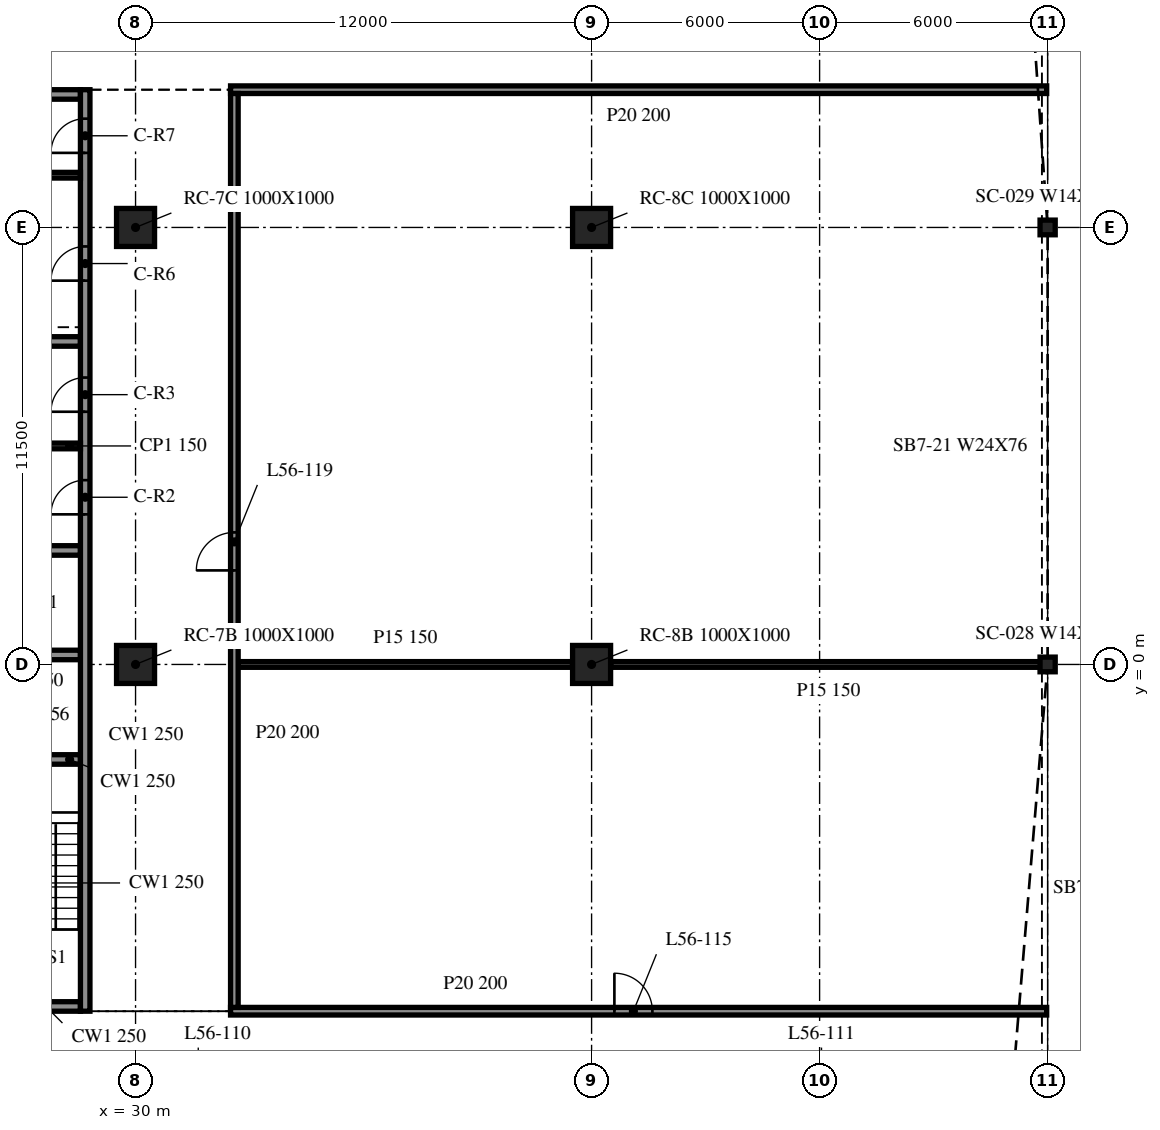
"""IFC4 building model, lengths in metres.
Left out: names, types, materials, properties, quantities, classifications, styles, units other than length and angle.
Written with IfcOpenShell. Run it as: python <this file> out.ifc"""

import sys

from ifc_helpers import new_model, si_unit, direction, frame, frame_2d, origin, origin_2d, place, context, subcontext, project, spatial, rectangle, i_section, extrude, element, fill, save


model = new_model("IFC4")
c1 = context("Model", 3, precision=1e-05, world=origin(), true_north=direction((0.0, 1.0)))
c2 = subcontext(c1, "Body", "Model", "MODEL_VIEW")
j1 = project(units=[si_unit("LENGTHUNIT", "METRE"), si_unit("PLANEANGLEUNIT", "RADIAN")], contexts=[c1])
p1 = place(None, origin())
s1 = spatial("IfcSite", under=j1, at=p1, CompositionType="ELEMENT")
p2 = place(p1, origin())
s2 = spatial("IfcBuilding", under=s1, at=p2, CompositionType="ELEMENT")
p3 = place(p2, frame((0.0, 0.0, 232.4)))
s3 = spatial("IfcBuildingStorey", under=s2, at=p3, CompositionType="ELEMENT", Elevation=232.4)
for number, where, z_axis, x_axis in (
    (1, (30.0, 0.0, -0.34), (0.0, 0.0, 1.0), (1.0, 0.0, 0.0)),
    (2, (30.0, 11.5, -0.34), (0.0, 0.0, 1.0), (1.0, 0.0, 0.0)),
    (3, (42.0, 0.0, -0.34), (0.0, 0.0, 1.0), (1.0, 0.0, 0.0)),
    (4, (42.0, 11.5, -0.34), (0.0, 0.0, 1.0), (1.0, 0.0, 0.0)),
):
    element("IfcColumn", number, at=place(p3, frame(where, z_axis=z_axis, x_axis=x_axis)), inside=s3, PredefinedType="COLUMN", context=c2, shape_type="SweptSolid", body=[
        extrude(rectangle(XDim=1.0, YDim=1.0, at=origin_2d()), origin(), (0.0, 0.0, 1.0), 3.8),
    ])
for number, where, z_axis, x_axis in (
    (5, (54.0, 0.0, -0.34), (0.0, 0.0, 1.0), (1.0, 0.0, 0.0)),
    (6, (54.0, 11.5, -0.34), (0.0, 0.0, 1.0), (1.0, 0.0, 0.0)),
):
    element("IfcColumn", number, at=place(p3, frame(where, z_axis=z_axis, x_axis=x_axis)), inside=s3, PredefinedType="COLUMN", context=c2, shape_type="SweptSolid", body=[
        extrude(i_section(OverallWidth=0.399, OverallDepth=0.386, WebThickness=0.021, FlangeThickness=0.033, at=origin_2d()), origin(), (0.0, 0.0, 1.0), 3.8),
    ])
p4 = place(p3, frame((28.675, -9.125, 0.0), z_axis=(0.0, 0.0, 1.0), x_axis=(0.0, 1.0, 0.0)))
e7 = element("IfcWall", 7, at=p4, inside=s3, PredefinedType="SOLIDWALL", context=c2, shape_type="SweptSolid", body=[
    extrude(rectangle(XDim=24.25, YDim=0.25, at=frame_2d((12.125, 0.0))), origin(), (0.0, 0.0, 1.0), 3.46),
])
p5 = place(p4, frame((13.075, 0.0, 0.0)))
e8 = element("IfcOpeningElement", 8, at=p5, cuts=e7, PredefinedType="OPENING", context=c2, shape_type="SweptSolid", body=[
    extrude(rectangle(XDim=0.9, YDim=2.1, at=frame_2d((0.45, 1.05))), frame((0.0, 0.135, 0.0), z_axis=(0.0, -1.0, 0.0), x_axis=(1.0, 0.0, 0.0)), (0.0, 0.0, 1.0), 0.27),
])
p6 = place(p4, frame((15.775, 0.0, 0.0)))
e9 = element("IfcOpeningElement", 9, at=p6, cuts=e7, PredefinedType="OPENING", context=c2, shape_type="SweptSolid", body=[
    extrude(rectangle(XDim=0.9, YDim=2.1, at=frame_2d((0.45, 1.05))), frame((0.0, 0.135, 0.0), z_axis=(0.0, -1.0, 0.0), x_axis=(1.0, 0.0, 0.0)), (0.0, 0.0, 1.0), 0.27),
])
p7 = place(p4, frame((19.225, 0.0, 0.0)))
e10 = element("IfcOpeningElement", 10, at=p7, cuts=e7, PredefinedType="OPENING", context=c2, shape_type="SweptSolid", body=[
    extrude(rectangle(XDim=0.9, YDim=2.1, at=frame_2d((0.45, 1.05))), frame((0.0, 0.135, 0.0), z_axis=(0.0, -1.0, 0.0), x_axis=(1.0, 0.0, 0.0)), (0.0, 0.0, 1.0), 0.27),
])
p8 = place(p4, frame((22.587, 0.0, 0.0)))
e11 = element("IfcOpeningElement", 11, at=p8, cuts=e7, PredefinedType="OPENING", context=c2, shape_type="SweptSolid", body=[
    extrude(rectangle(XDim=0.9, YDim=2.1, at=frame_2d((0.45, 1.05))), frame((0.0, 0.135, 0.0), z_axis=(0.0, -1.0, 0.0), x_axis=(1.0, 0.0, 0.0)), (0.0, 0.0, 1.0), 0.27),
])
p9 = place(p3, frame((28.55, -9.0, 0.0), z_axis=(0.0, 0.0, 1.0), x_axis=(-1.0, 0.0, 0.0)))
e12 = element("IfcWall", 12, at=p9, inside=s3, PredefinedType="SOLIDWALL", context=c2, shape_type="SweptSolid", body=[
    extrude(rectangle(XDim=9.1, YDim=0.25, at=frame_2d((4.55, 0.0))), origin(), (0.0, 0.0, 1.0), 3.46),
])
p10 = place(p9, frame((3.65, 0.0, 0.0)))
e13 = element("IfcOpeningElement", 13, at=p10, cuts=e12, PredefinedType="OPENING", context=c2, shape_type="SweptSolid", body=[
    extrude(rectangle(XDim=1.8, YDim=2.1, at=frame_2d((0.9, 1.05))), frame((0.0, 0.135, 0.0), z_axis=(0.0, -1.0, 0.0), x_axis=(1.0, 0.0, 0.0)), (0.0, 0.0, 1.0), 0.27),
])
p11 = place(p3, frame((19.45, 15.0, 0.0), z_axis=(0.0, 0.0, 1.0), x_axis=(1.0, 0.0, 0.0)))
e14 = element("IfcWall", 14, at=p11, inside=s3, PredefinedType="SOLIDWALL", context=c2, shape_type="SweptSolid", body=[
    extrude(rectangle(XDim=9.1, YDim=0.25, at=frame_2d((4.55, 0.0))), origin(), (0.0, 0.0, 1.0), 3.46),
])
p12 = place(p11, frame((3.65, 0.0, 0.0)))
e15 = element("IfcOpeningElement", 15, at=p12, cuts=e14, PredefinedType="OPENING", context=c2, shape_type="SweptSolid", body=[
    extrude(rectangle(XDim=1.8, YDim=2.1, at=frame_2d((0.9, 1.05))), frame((0.0, 0.135, 0.0), z_axis=(0.0, -1.0, 0.0), x_axis=(1.0, 0.0, 0.0)), (0.0, 0.0, 1.0), 0.27),
])
for number, where, z_axis, x_axis in (
    (16, (25.7, -2.5, 0.0), (0.0, 0.0, 1.0), (1.0, 0.0, 0.0)),
    (17, (25.7, 0.25, 0.0), (0.0, 0.0, 1.0), (1.0, 0.0, 0.0)),
    (18, (25.7, 3.0, 0.0), (0.0, 0.0, 1.0), (1.0, 0.0, 0.0)),
    (19, (25.7, 8.5, 0.0), (0.0, 0.0, 1.0), (1.0, 0.0, 0.0)),
):
    element("IfcWall", number, at=place(p3, frame(where, z_axis=z_axis, x_axis=x_axis)), inside=s3, PredefinedType="SOLIDWALL", context=c2, shape_type="SweptSolid", body=[
        extrude(rectangle(XDim=2.85, YDim=0.25, at=frame_2d((1.425, 0.0))), origin(), (0.0, 0.0, 1.0), 3.46),
    ])
for number, where, z_axis, x_axis in (
    (20, (25.7, 5.75, 0.0), (0.0, 0.0, 1.0), (1.0, 0.0, 0.0)),
    (21, (25.7, 12.875, 0.0), (0.0, 0.0, 1.0), (1.0, 0.0, 0.0)),
):
    element("IfcWall", number, at=place(p3, frame(where, z_axis=z_axis, x_axis=x_axis)), inside=s3, PredefinedType="PARTITIONING", context=c2, shape_type="SweptSolid", body=[
        extrude(rectangle(XDim=2.85, YDim=0.15, at=frame_2d((1.425, 0.0))), origin(), (0.0, 0.0, 1.0), 3.46),
    ])
p13 = place(p3, frame((32.5, -9.125, 0.0), z_axis=(0.0, 0.0, 1.0), x_axis=(1.0, 0.0, 0.0)))
e22 = element("IfcWall", 22, at=p13, inside=s3, PredefinedType="PARTITIONING", context=c2, shape_type="SweptSolid", body=[
    extrude(rectangle(XDim=21.475, YDim=0.2, at=frame_2d((10.738, 0.0))), origin(), (0.0, 0.0, 1.0), 3.46),
])
p14 = place(p13, frame((10.1, 0.0, 0.0)))
e23 = element("IfcOpeningElement", 23, at=p14, cuts=e22, PredefinedType="OPENING", context=c2, shape_type="SweptSolid", body=[
    extrude(rectangle(XDim=1.0, YDim=2.1, at=frame_2d((0.5, 1.05))), frame((0.0, 0.11, 0.0), z_axis=(0.0, -1.0, 0.0), x_axis=(1.0, 0.0, 0.0)), (0.0, 0.0, 1.0), 0.22),
])
p15 = place(p3, frame((32.7, 0.0, 0.0), z_axis=(0.0, 0.0, 1.0), x_axis=(1.0, 0.0, 0.0)))
e24 = element("IfcWall", 24, at=p15, inside=s3, PredefinedType="PARTITIONING", context=c2, shape_type="SweptSolid", body=[
    extrude(rectangle(XDim=8.8, YDim=0.15, at=frame_2d((4.4, 0.0))), origin(), (0.0, 0.0, 1.0), 3.46),
])
p16 = place(p3, frame((42.5, 0.0, 0.0), z_axis=(0.0, 0.0, 1.0), x_axis=(1.0, 0.0, 0.0)))
e25 = element("IfcWall", 25, at=p16, inside=s3, PredefinedType="PARTITIONING", context=c2, shape_type="SweptSolid", body=[
    extrude(rectangle(XDim=11.475, YDim=0.15, at=frame_2d((5.738, 0.0))), origin(), (0.0, 0.0, 1.0), 3.46),
])
p17 = place(p3, frame((32.5, 15.125, 0.0), z_axis=(0.0, 0.0, 1.0), x_axis=(1.0, 0.0, 0.0)))
e26 = element("IfcWall", 26, at=p17, inside=s3, PredefinedType="PARTITIONING", context=c2, shape_type="SweptSolid", body=[
    extrude(rectangle(XDim=21.475, YDim=0.2, at=frame_2d((10.738, 0.0))), origin(), (0.0, 0.0, 1.0), 3.46),
])
p18 = place(p3, frame((32.6, -9.025, 0.0), z_axis=(0.0, 0.0, 1.0), x_axis=(0.0, 1.0, 0.0)))
e27 = element("IfcWall", 27, at=p18, inside=s3, PredefinedType="PARTITIONING", context=c2, shape_type="SweptSolid", body=[
    extrude(rectangle(XDim=24.05, YDim=0.2, at=frame_2d((12.025, 0.0))), origin(), (0.0, 0.0, 1.0), 3.46),
])
p19 = place(p18, frame((11.5, 0.0, 0.0)))
e28 = element("IfcOpeningElement", 28, at=p19, cuts=e27, PredefinedType="OPENING", context=c2, shape_type="SweptSolid", body=[
    extrude(rectangle(XDim=1.0, YDim=2.1, at=frame_2d((0.5, 1.05))), frame((0.0, 0.11, 0.0), z_axis=(0.0, -1.0, 0.0), x_axis=(1.0, 0.0, 0.0)), (0.0, 0.0, 1.0), 0.22),
])
p20 = place(p5, origin())
e29 = element("IfcDoor", 29, at=p20, inside=s3, OperationType="SINGLE_SWING_RIGHT", PredefinedType="DOOR", context=c2, shape_type="SweptSolid", body=[
    extrude(rectangle(XDim=0.9, YDim=2.1, at=frame_2d((0.45, 1.05))), frame((0.0, 0.025, 0.0), z_axis=(0.0, -1.0, 0.0), x_axis=(1.0, 0.0, 0.0)), (0.0, 0.0, 1.0), 0.05),
])
fill(e8, e29)
p21 = place(p6, origin())
e30 = element("IfcDoor", 30, at=p21, inside=s3, OperationType="SINGLE_SWING_LEFT", PredefinedType="DOOR", context=c2, shape_type="SweptSolid", body=[
    extrude(rectangle(XDim=0.9, YDim=2.1, at=frame_2d((0.45, 1.05))), frame((0.0, 0.025, 0.0), z_axis=(0.0, -1.0, 0.0), x_axis=(1.0, 0.0, 0.0)), (0.0, 0.0, 1.0), 0.05),
])
fill(e9, e30)
p22 = place(p7, origin())
e31 = element("IfcDoor", 31, at=p22, inside=s3, OperationType="SINGLE_SWING_RIGHT", PredefinedType="DOOR", context=c2, shape_type="SweptSolid", body=[
    extrude(rectangle(XDim=0.9, YDim=2.1, at=frame_2d((0.45, 1.05))), frame((0.0, 0.025, 0.0), z_axis=(0.0, -1.0, 0.0), x_axis=(1.0, 0.0, 0.0)), (0.0, 0.0, 1.0), 0.05),
])
fill(e10, e31)
p23 = place(p8, origin())
e32 = element("IfcDoor", 32, at=p23, inside=s3, OperationType="SINGLE_SWING_LEFT", PredefinedType="DOOR", context=c2, shape_type="SweptSolid", body=[
    extrude(rectangle(XDim=0.9, YDim=2.1, at=frame_2d((0.45, 1.05))), frame((0.0, 0.025, 0.0), z_axis=(0.0, -1.0, 0.0), x_axis=(1.0, 0.0, 0.0)), (0.0, 0.0, 1.0), 0.05),
])
fill(e11, e32)
p24 = place(p14, origin())
e33 = element("IfcDoor", 33, at=p24, inside=s3, OperationType="SINGLE_SWING_LEFT", PredefinedType="DOOR", context=c2, shape_type="SweptSolid", body=[
    extrude(rectangle(XDim=1.0, YDim=2.1, at=frame_2d((0.5, 1.05))), frame((0.0, 0.025, 0.0), z_axis=(0.0, -1.0, 0.0), x_axis=(1.0, 0.0, 0.0)), (0.0, 0.0, 1.0), 0.05),
])
fill(e23, e33)
p25 = place(p19, origin())
e34 = element("IfcDoor", 34, at=p25, inside=s3, OperationType="SINGLE_SWING_RIGHT", PredefinedType="DOOR", context=c2, shape_type="SweptSolid", body=[
    extrude(rectangle(XDim=1.0, YDim=2.1, at=frame_2d((0.5, 1.05))), frame((0.0, 0.025, 0.0), z_axis=(0.0, -1.0, 0.0), x_axis=(1.0, 0.0, 0.0)), (0.0, 0.0, 1.0), 0.05),
])
fill(e28, e34)
save(model, sys.argv[1])
